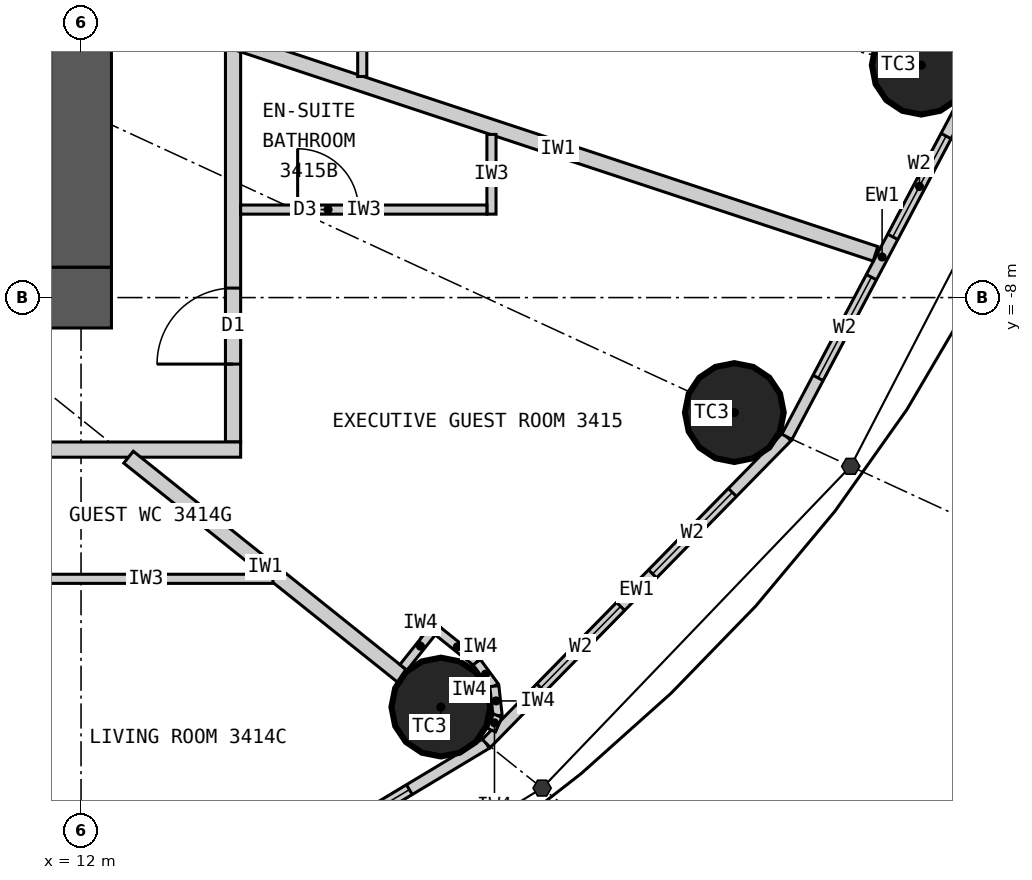
"""IFC4 building model, lengths in metres.
Left out: names, types, materials, properties, quantities, classifications, styles, units other than length and angle.
Written with IfcOpenShell. Run it as: python <this file> out.ifc"""

import sys

from ifc_helpers import new_model, si_unit, direction, frame, frame_2d, origin, origin_2d, place, context, subcontext, project, spatial, rectangle, circle, extrude, element, fill, save


model = new_model("IFC4")
c1 = context("Model", 3, precision=1e-05, world=origin(), true_north=direction((0.0, 1.0)))
c2 = subcontext(c1, "Body", "Model", "MODEL_VIEW")
j1 = project(units=[si_unit("LENGTHUNIT", "METRE"), si_unit("PLANEANGLEUNIT", "RADIAN")], contexts=[c1])
p1 = place(None, origin())
s1 = spatial("IfcSite", under=j1, at=p1, CompositionType="ELEMENT")
p2 = place(p1, origin())
s2 = spatial("IfcBuilding", under=s1, at=p2, CompositionType="ELEMENT")
p3 = place(p2, frame((0.0, 0.0, 132.0)))
s3 = spatial("IfcBuildingStorey", under=s2, at=p3, CompositionType="ELEMENT", Elevation=132.0)
for number, where, z_axis, x_axis in (
    (1, (16.734, -13.387, 0.0), (0.0, 0.0, 1.0), (1.0, 0.0, 0.0)),
    (2, (20.596, -9.513, 0.0), (0.0, 0.0, 1.0), (1.0, 0.0, 0.0)),
    (3, (23.055, -4.942, 0.0), (0.0, 0.0, 1.0), (1.0, 0.0, 0.0)),
):
    element("IfcColumn", number, at=place(p3, frame(where, z_axis=z_axis, x_axis=x_axis)), inside=s3, PredefinedType="COLUMN", context=c2, shape_type="SweptSolid", body=[
        extrude(circle(Radius=0.65, at=origin_2d()), origin(), (0.0, 0.0, 1.0), 3.3),
    ])
p4 = place(p3, frame((12.4, -8.0, 0.0), z_axis=(0.0, 0.0, 1.0), x_axis=(-1.0, 0.0, 0.0)))
e4 = element("IfcWall", 4, at=p4, inside=s3, PredefinedType="SHEAR", context=c2, shape_type="SweptSolid", body=[
    extrude(rectangle(XDim=24.8, YDim=0.8, at=frame_2d((12.4, 0.0))), origin(), (0.0, 0.0, 1.0), 3.3),
])
p5 = place(p4, frame((11.1, 0.0, 0.0)))
e5 = element("IfcOpeningElement", 5, at=p5, cuts=e4, PredefinedType="OPENING", context=c2, shape_type="SweptSolid", body=[
    extrude(rectangle(XDim=1.2, YDim=2.2, at=frame_2d((0.6, 1.1))), frame((0.0, 0.41, 0.0), z_axis=(0.0, -1.0, 0.0), x_axis=(1.0, 0.0, 0.0)), (0.0, 0.0, 1.0), 0.82),
])
p6 = place(p4, frame((18.7, 0.0, 0.0)))
e6 = element("IfcOpeningElement", 6, at=p6, cuts=e4, PredefinedType="OPENING", context=c2, shape_type="SweptSolid", body=[
    extrude(rectangle(XDim=0.9, YDim=2.2, at=frame_2d((0.45, 1.1))), frame((0.0, 0.41, 0.0), z_axis=(0.0, -1.0, 0.0), x_axis=(1.0, 0.0, 0.0)), (0.0, 0.0, 1.0), 0.82),
])
p7 = place(p3, frame((12.0, -7.6, 0.0), z_axis=(0.0, 0.0, 1.0), x_axis=(0.0, 1.0, 0.0)))
e7 = element("IfcWall", 7, at=p7, inside=s3, PredefinedType="SHEAR", context=c2, shape_type="SweptSolid", body=[
    extrude(rectangle(XDim=15.2, YDim=0.8, at=frame_2d((7.6, 0.0))), origin(), (0.0, 0.0, 1.0), 3.3),
])
p8 = place(p7, frame((6.7, 0.0, 0.0)))
e8 = element("IfcOpeningElement", 8, at=p8, cuts=e7, PredefinedType="OPENING", context=c2, shape_type="SweptSolid", body=[
    extrude(rectangle(XDim=1.8, YDim=2.2, at=frame_2d((0.9, 1.1))), frame((0.0, 0.41, 0.0), z_axis=(0.0, -1.0, 0.0), x_axis=(1.0, 0.0, 0.0)), (0.0, 0.0, 1.0), 0.82),
])
p9 = place(p3, frame((12.221, -16.935, 0.0), z_axis=(0.0, 0.0, 1.0), x_axis=(0.857308573723, 0.514802884044, 0.0)))
e9 = element("IfcWall", 9, at=p9, inside=s3, PredefinedType="ELEMENTEDWALL", context=c2, shape_type="SweptSolid", body=[
    extrude(rectangle(XDim=5.961, YDim=0.15, at=frame_2d((2.98, 0.0))), origin(), (0.0, 0.0, 1.0), 3.12),
])
p10 = place(p9, frame((1.181, 0.0, 0.9)))
e10 = element("IfcOpeningElement", 10, at=p10, cuts=e9, PredefinedType="OPENING", context=c2, shape_type="SweptSolid", body=[
    extrude(rectangle(XDim=1.5, YDim=1.9, at=frame_2d((0.75, 0.95))), frame((0.0, 0.085, 0.0), z_axis=(0.0, -1.0, 0.0), x_axis=(1.0, 0.0, 0.0)), (0.0, 0.0, 1.0), 0.17),
])
p11 = place(p9, frame((3.281, 0.0, 0.9)))
e11 = element("IfcOpeningElement", 11, at=p11, cuts=e9, PredefinedType="OPENING", context=c2, shape_type="SweptSolid", body=[
    extrude(rectangle(XDim=1.5, YDim=1.9, at=frame_2d((0.75, 0.95))), frame((0.0, 0.085, 0.0), z_axis=(0.0, -1.0, 0.0), x_axis=(1.0, 0.0, 0.0)), (0.0, 0.0, 1.0), 0.17),
])
p12 = place(p3, frame((17.332, -13.866, 0.0), z_axis=(0.0, 0.0, 1.0), x_axis=(0.700136650834, 0.714008872605, 0.0)))
e12 = element("IfcWall", 12, at=p12, inside=s3, PredefinedType="ELEMENTEDWALL", context=c2, shape_type="SweptSolid", body=[
    extrude(rectangle(XDim=5.649, YDim=0.15, at=frame_2d((2.825, 0.0))), origin(), (0.0, 0.0, 1.0), 3.12),
])
p13 = place(p12, frame((1.025, 0.0, 0.9)))
e13 = element("IfcOpeningElement", 13, at=p13, cuts=e12, PredefinedType="OPENING", context=c2, shape_type="SweptSolid", body=[
    extrude(rectangle(XDim=1.5, YDim=1.9, at=frame_2d((0.75, 0.95))), frame((0.0, 0.085, 0.0), z_axis=(0.0, -1.0, 0.0), x_axis=(1.0, 0.0, 0.0)), (0.0, 0.0, 1.0), 0.17),
])
p14 = place(p12, frame((3.125, 0.0, 0.9)))
e14 = element("IfcOpeningElement", 14, at=p14, cuts=e12, PredefinedType="OPENING", context=c2, shape_type="SweptSolid", body=[
    extrude(rectangle(XDim=1.5, YDim=1.9, at=frame_2d((0.75, 0.95))), frame((0.0, 0.085, 0.0), z_axis=(0.0, -1.0, 0.0), x_axis=(1.0, 0.0, 0.0)), (0.0, 0.0, 1.0), 0.17),
])
p15 = place(p3, frame((21.287, -9.832, 0.0), z_axis=(0.0, 0.0, 1.0), x_axis=(0.467814388454, 0.883826735257, 0.0)))
e15 = element("IfcWall", 15, at=p15, inside=s3, PredefinedType="ELEMENTEDWALL", context=c2, shape_type="SweptSolid", body=[
    extrude(rectangle(XDim=5.354, YDim=0.15, at=frame_2d((2.677, 0.0))), origin(), (0.0, 0.0, 1.0), 3.12),
])
p16 = place(p15, frame((0.877, 0.0, 0.9)))
e16 = element("IfcOpeningElement", 16, at=p16, cuts=e15, PredefinedType="OPENING", context=c2, shape_type="SweptSolid", body=[
    extrude(rectangle(XDim=1.5, YDim=1.9, at=frame_2d((0.75, 0.95))), frame((0.0, 0.085, 0.0), z_axis=(0.0, -1.0, 0.0), x_axis=(1.0, 0.0, 0.0)), (0.0, 0.0, 1.0), 0.17),
])
p17 = place(p15, frame((2.977, 0.0, 0.9)))
e17 = element("IfcOpeningElement", 17, at=p17, cuts=e15, PredefinedType="OPENING", context=c2, shape_type="SweptSolid", body=[
    extrude(rectangle(XDim=1.5, YDim=1.9, at=frame_2d((0.75, 0.95))), frame((0.0, 0.085, 0.0), z_axis=(0.0, -1.0, 0.0), x_axis=(1.0, 0.0, 0.0)), (0.0, 0.0, 1.0), 0.17),
])
p18 = place(p3, frame((14.0, -9.9, 0.0), z_axis=(0.0, 0.0, 1.0), x_axis=(0.0, 1.0, 0.0)))
e18 = element("IfcWall", 18, at=p18, inside=s3, PredefinedType="PARTITIONING", context=c2, shape_type="SweptSolid", body=[
    extrude(rectangle(XDim=19.8, YDim=0.2, at=frame_2d((9.9, 0.0))), origin(), (0.0, 0.0, 1.0), 3.12),
])
p19 = place(p18, frame((1.025, 0.0, 0.0)))
e19 = element("IfcOpeningElement", 19, at=p19, cuts=e18, PredefinedType="OPENING", context=c2, shape_type="SweptSolid", body=[
    extrude(rectangle(XDim=1.0, YDim=2.2, at=frame_2d((0.5, 1.1))), frame((0.0, 0.11, 0.0), z_axis=(0.0, -1.0, 0.0), x_axis=(1.0, 0.0, 0.0)), (0.0, 0.0, 1.0), 0.22),
])
p20 = place(p18, frame((6.798, 0.0, 0.0)))
e20 = element("IfcOpeningElement", 20, at=p20, cuts=e18, PredefinedType="OPENING", context=c2, shape_type="SweptSolid", body=[
    extrude(rectangle(XDim=1.0, YDim=2.2, at=frame_2d((0.5, 1.1))), frame((0.0, 0.11, 0.0), z_axis=(0.0, -1.0, 0.0), x_axis=(1.0, 0.0, 0.0)), (0.0, 0.0, 1.0), 0.22),
])
p21 = place(p18, frame((13.242, 0.0, 0.0)))
e21 = element("IfcOpeningElement", 21, at=p21, cuts=e18, PredefinedType="OPENING", context=c2, shape_type="SweptSolid", body=[
    extrude(rectangle(XDim=1.0, YDim=2.2, at=frame_2d((0.5, 1.1))), frame((0.0, 0.11, 0.0), z_axis=(0.0, -1.0, 0.0), x_axis=(1.0, 0.0, 0.0)), (0.0, 0.0, 1.0), 0.22),
])
p22 = place(p18, frame((17.777, 0.0, 0.0)))
e22 = element("IfcOpeningElement", 22, at=p22, cuts=e18, PredefinedType="OPENING", context=c2, shape_type="SweptSolid", body=[
    extrude(rectangle(XDim=1.0, YDim=2.2, at=frame_2d((0.5, 1.1))), frame((0.0, 0.11, 0.0), z_axis=(0.0, -1.0, 0.0), x_axis=(1.0, 0.0, 0.0)), (0.0, 0.0, 1.0), 0.22),
])
p23 = place(p3, frame((14.1, -10.0, 0.0), z_axis=(0.0, 0.0, 1.0), x_axis=(-1.0, 0.0, 0.0)))
e23 = element("IfcWall", 23, at=p23, inside=s3, PredefinedType="PARTITIONING", context=c2, shape_type="SweptSolid", body=[
    extrude(rectangle(XDim=10.817, YDim=0.2, at=frame_2d((5.409, 0.0))), origin(), (0.0, 0.0, 1.0), 3.12),
])
p24 = place(p23, frame((3.035, 0.0, 0.0)))
e24 = element("IfcOpeningElement", 24, at=p24, cuts=e23, PredefinedType="OPENING", context=c2, shape_type="SweptSolid", body=[
    extrude(rectangle(XDim=1.0, YDim=2.2, at=frame_2d((0.5, 1.1))), frame((0.0, 0.11, 0.0), z_axis=(0.0, -1.0, 0.0), x_axis=(1.0, 0.0, 0.0)), (0.0, 0.0, 1.0), 0.22),
])
p25 = place(p3, frame((12.625, -10.1, 0.0), z_axis=(0.0, 0.0, 1.0), x_axis=(0.780863644897, -0.624701503182, 0.0)))
e25 = element("IfcWall", 25, at=p25, inside=s3, PredefinedType="PARTITIONING", context=c2, shape_type="SweptSolid", body=[
    extrude(rectangle(XDim=4.612, YDim=0.2, at=frame_2d((2.306, 0.0))), origin(), (0.0, 0.0, 1.0), 2.27),
])
p26 = place(p3, frame((14.1, -4.662, 0.0), z_axis=(0.0, 0.0, 1.0), x_axis=(0.949446466373, -0.313928984789, 0.0)))
e26 = element("IfcWall", 26, at=p26, inside=s3, PredefinedType="PARTITIONING", context=c2, shape_type="SweptSolid", body=[
    extrude(rectangle(XDim=8.797, YDim=0.2, at=frame_2d((4.399, 0.0))), origin(), (0.0, 0.0, 1.0), 3.12),
])
p27 = place(p3, frame((14.525, -11.7, 0.0), z_axis=(0.0, 0.0, 1.0), x_axis=(-1.0, 0.0, 0.0)))
e27 = element("IfcWall", 27, at=p27, inside=s3, PredefinedType="PARTITIONING", context=c2, shape_type="SweptSolid", body=[
    extrude(rectangle(XDim=3.34, YDim=0.12, at=frame_2d((1.67, 0.0))), origin(), (0.0, 0.0, 1.0), 3.12),
])
p28 = place(p3, frame((17.4, -5.854, 0.0), z_axis=(0.0, 0.0, 1.0), x_axis=(0.0, -1.0, 0.0)))
e28 = element("IfcWall", 28, at=p28, inside=s3, PredefinedType="PARTITIONING", context=c2, shape_type="SweptSolid", body=[
    extrude(rectangle(XDim=1.049, YDim=0.12, at=frame_2d((0.524, 0.0))), origin(), (0.0, 0.0, 1.0), 3.12),
])
p29 = place(p3, frame((14.1, -6.842, 0.0), z_axis=(0.0, 0.0, 1.0), x_axis=(1.0, 0.0, 0.0)))
e29 = element("IfcWall", 29, at=p29, inside=s3, PredefinedType="PARTITIONING", context=c2, shape_type="SweptSolid", body=[
    extrude(rectangle(XDim=3.24, YDim=0.12, at=frame_2d((1.62, 0.0))), origin(), (0.0, 0.0, 1.0), 3.12),
])
p30 = place(p29, frame((0.75, 0.0, 0.0)))
e30 = element("IfcOpeningElement", 30, at=p30, cuts=e29, PredefinedType="OPENING", context=c2, shape_type="SweptSolid", body=[
    extrude(rectangle(XDim=0.8, YDim=2.1, at=frame_2d((0.4, 1.05))), frame((0.0, 0.07, 0.0), z_axis=(0.0, -1.0, 0.0), x_axis=(1.0, 0.0, 0.0)), (0.0, 0.0, 1.0), 0.14),
])
p31 = place(p3, frame((15.7, -5.091, 0.0), z_axis=(0.0, 0.0, 1.0), x_axis=(0.0, 1.0, 0.0)))
e31 = element("IfcWall", 31, at=p31, inside=s3, PredefinedType="PARTITIONING", context=c2, shape_type="SweptSolid", body=[
    extrude(rectangle(XDim=1.869, YDim=0.12, at=frame_2d((0.935, 0.0))), origin(), (0.0, 0.0, 1.0), 3.12),
])
p32 = place(p3, frame((16.242, -12.865, 0.0), z_axis=(0.0, 0.0, 1.0), x_axis=(0.624861414622, 0.780735686719, 0.0)))
e32 = element("IfcWall", 32, at=p32, inside=s3, PredefinedType="PARTITIONING", context=c2, shape_type="SweptSolid", body=[
    extrude(rectangle(XDim=0.716, YDim=0.12, at=frame_2d((0.358, 0.0))), origin(), (0.0, 0.0, 1.0), 3.12),
])
p33 = place(p3, frame((16.698, -12.391, 0.0), z_axis=(0.0, 0.0, 1.0), x_axis=(0.780722240533, -0.624878214645, 0.0)))
e33 = element("IfcWall", 33, at=p33, inside=s3, PredefinedType="PARTITIONING", context=c2, shape_type="SweptSolid", body=[
    extrude(rectangle(XDim=0.65, YDim=0.12, at=frame_2d((0.325, 0.0))), origin(), (0.0, 0.0, 1.0), 3.12),
])
p34 = place(p3, frame((17.206, -12.797, 0.0), z_axis=(0.0, 0.0, 1.0), x_axis=(0.592986095904, -0.805212698648, 0.0)))
e34 = element("IfcWall", 34, at=p34, inside=s3, PredefinedType="PARTITIONING", context=c2, shape_type="SweptSolid", body=[
    extrude(rectangle(XDim=0.391, YDim=0.12, at=frame_2d((0.196, 0.0))), origin(), (0.0, 0.0, 1.0), 3.12),
])
p35 = place(p3, frame((17.438, -13.112, 0.0), z_axis=(0.0, 0.0, 1.0), x_axis=(0.109815164188, -0.993952025862, 0.0)))
e35 = element("IfcWall", 35, at=p35, inside=s3, PredefinedType="PARTITIONING", context=c2, shape_type="SweptSolid", body=[
    extrude(rectangle(XDim=0.391, YDim=0.12, at=frame_2d((0.196, 0.0))), origin(), (0.0, 0.0, 1.0), 3.12),
])
p36 = place(p3, frame((17.481, -13.501, 0.0), z_axis=(0.0, 0.0, 1.0), x_axis=(-0.401504188288, -0.915857186895, 0.0)))
e36 = element("IfcWall", 36, at=p36, inside=s3, PredefinedType="PARTITIONING", context=c2, shape_type="SweptSolid", body=[
    extrude(rectangle(XDim=0.206, YDim=0.12, at=frame_2d((0.103, 0.0))), origin(), (0.0, 0.0, 1.0), 3.12),
])
p37 = place(p11, origin())
e37 = element("IfcWindow", 37, at=p37, inside=s3, PartitioningType="SINGLE_PANEL", PredefinedType="WINDOW", context=c2, shape_type="SweptSolid", body=[
    extrude(rectangle(XDim=1.5, YDim=1.9, at=frame_2d((0.75, 0.95))), frame((0.0, 0.03, 0.0), z_axis=(0.0, -1.0, 0.0), x_axis=(1.0, 0.0, 0.0)), (0.0, 0.0, 1.0), 0.06),
])
fill(e11, e37)
p38 = place(p13, origin())
e38 = element("IfcWindow", 38, at=p38, inside=s3, PartitioningType="SINGLE_PANEL", PredefinedType="WINDOW", context=c2, shape_type="SweptSolid", body=[
    extrude(rectangle(XDim=1.5, YDim=1.9, at=frame_2d((0.75, 0.95))), frame((0.0, 0.03, 0.0), z_axis=(0.0, -1.0, 0.0), x_axis=(1.0, 0.0, 0.0)), (0.0, 0.0, 1.0), 0.06),
])
fill(e13, e38)
p39 = place(p14, origin())
e39 = element("IfcWindow", 39, at=p39, inside=s3, PartitioningType="SINGLE_PANEL", PredefinedType="WINDOW", context=c2, shape_type="SweptSolid", body=[
    extrude(rectangle(XDim=1.5, YDim=1.9, at=frame_2d((0.75, 0.95))), frame((0.0, 0.03, 0.0), z_axis=(0.0, -1.0, 0.0), x_axis=(1.0, 0.0, 0.0)), (0.0, 0.0, 1.0), 0.06),
])
fill(e14, e39)
p40 = place(p16, origin())
e40 = element("IfcWindow", 40, at=p40, inside=s3, PartitioningType="SINGLE_PANEL", PredefinedType="WINDOW", context=c2, shape_type="SweptSolid", body=[
    extrude(rectangle(XDim=1.5, YDim=1.9, at=frame_2d((0.75, 0.95))), frame((0.0, 0.03, 0.0), z_axis=(0.0, -1.0, 0.0), x_axis=(1.0, 0.0, 0.0)), (0.0, 0.0, 1.0), 0.06),
])
fill(e16, e40)
p41 = place(p17, origin())
e41 = element("IfcWindow", 41, at=p41, inside=s3, PartitioningType="SINGLE_PANEL", PredefinedType="WINDOW", context=c2, shape_type="SweptSolid", body=[
    extrude(rectangle(XDim=1.5, YDim=1.9, at=frame_2d((0.75, 0.95))), frame((0.0, 0.03, 0.0), z_axis=(0.0, -1.0, 0.0), x_axis=(1.0, 0.0, 0.0)), (0.0, 0.0, 1.0), 0.06),
])
fill(e17, e41)
p42 = place(p30, origin())
e42 = element("IfcDoor", 42, at=p42, inside=s3, OperationType="SINGLE_SWING_LEFT", PredefinedType="DOOR", context=c2, shape_type="SweptSolid", body=[
    extrude(rectangle(XDim=0.8, YDim=2.1, at=frame_2d((0.4, 1.05))), frame((0.0, 0.025, 0.0), z_axis=(0.0, -1.0, 0.0), x_axis=(1.0, 0.0, 0.0)), (0.0, 0.0, 1.0), 0.05),
])
fill(e30, e42)
p43 = place(p19, origin())
e43 = element("IfcDoor", 43, at=p43, inside=s3, OperationType="SINGLE_SWING_LEFT", PredefinedType="DOOR", context=c2, shape_type="SweptSolid", body=[
    extrude(rectangle(XDim=1.0, YDim=2.2, at=frame_2d((0.5, 1.1))), frame((0.0, 0.025, 0.0), z_axis=(0.0, -1.0, 0.0), x_axis=(1.0, 0.0, 0.0)), (0.0, 0.0, 1.0), 0.05),
])
fill(e19, e43)
save(model, sys.argv[1])
